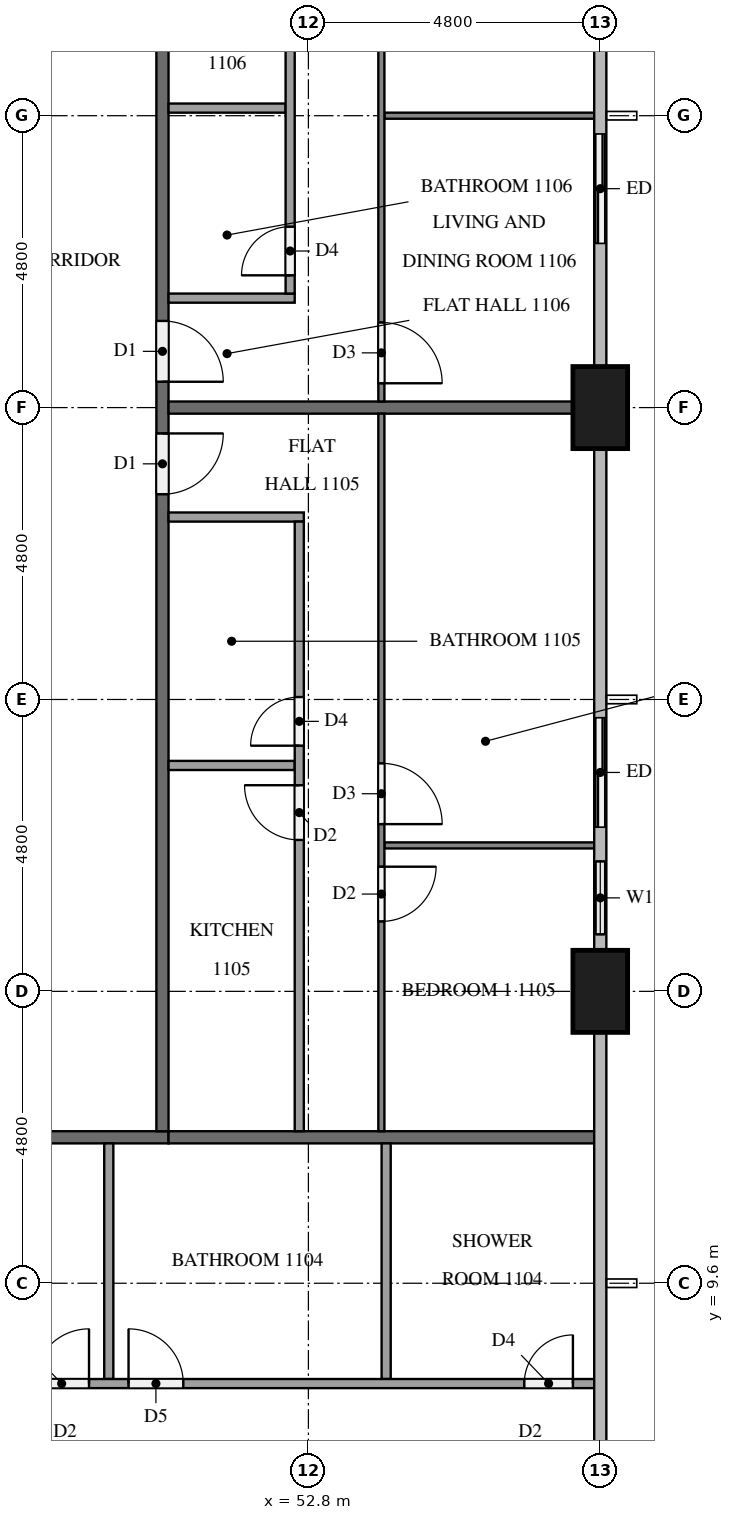
"""IFC4 building model, lengths in metres.
Left out: names, types, materials, properties, quantities, classifications, styles, units other than length and angle.
Written with IfcOpenShell. Run it as: python <this file> out.ifc"""

import sys

from ifc_helpers import new_model, si_unit, direction, frame, frame_2d, origin, origin_2d, place, context, subcontext, project, spatial, rectangle, extrude, element, fill, save


model = new_model("IFC4")
c1 = context("Model", 3, precision=1e-05, world=origin(), true_north=direction((0.0, 1.0)))
c2 = subcontext(c1, "Body", "Model", "MODEL_VIEW")
j1 = project(units=[si_unit("LENGTHUNIT", "METRE"), si_unit("PLANEANGLEUNIT", "RADIAN")], contexts=[c1])
p1 = place(None, origin())
s1 = spatial("IfcSite", under=j1, at=p1, CompositionType="ELEMENT")
p2 = place(p1, origin())
s2 = spatial("IfcBuilding", under=s1, at=p2, CompositionType="ELEMENT")
p3 = place(p2, frame((0.0, 0.0, 46.9)))
s3 = spatial("IfcBuildingStorey", under=s2, at=p3, CompositionType="ELEMENT", Elevation=46.9)
for number, where, z_axis, x_axis in (
    (1, (57.6, 14.4, 0.0), (0.0, 0.0, 1.0), (0.0, 1.0, 0.0)),
    (2, (57.6, 24.0, 0.0), (0.0, 0.0, 1.0), (0.0, 1.0, 0.0)),
):
    element("IfcColumn", number, at=place(p3, frame(where, z_axis=z_axis, x_axis=x_axis)), inside=s3, PredefinedType="COLUMN", context=c2, shape_type="SweptSolid", body=[
        extrude(rectangle(XDim=1.35, YDim=0.9, at=origin_2d()), origin(), (0.0, 0.0, 1.0), 3.2),
    ])
p4 = place(p3, frame((57.6, 15.075, 0.0), z_axis=(0.0, 0.0, 1.0), x_axis=(0.0, 1.0, 0.0)))
e3 = element("IfcWall", 3, at=p4, inside=s3, PredefinedType="SOLIDWALL", context=c2, shape_type="SweptSolid", body=[
    extrude(rectangle(XDim=4.125, YDim=0.15, at=frame_2d((2.062, 0.0))), origin(), (0.0, 0.0, 1.0), 3.2),
])
p5 = place(p4, frame((0.262, 0.0, 0.9)))
e4 = element("IfcOpeningElement", 4, at=p5, cuts=e3, PredefinedType="OPENING", context=c2, shape_type="SweptSolid", body=[
    extrude(rectangle(XDim=1.2, YDim=1.4, at=frame_2d((0.6, 0.7))), frame((0.0, 0.085, 0.0), z_axis=(0.0, -1.0, 0.0), x_axis=(1.0, 0.0, 0.0)), (0.0, 0.0, 1.0), 0.17),
])
p6 = place(p4, frame((2.025, 0.0, 0.0)))
e5 = element("IfcOpeningElement", 5, at=p6, cuts=e3, PredefinedType="OPENING", context=c2, shape_type="SweptSolid", body=[
    extrude(rectangle(XDim=1.8, YDim=2.4, at=frame_2d((0.9, 1.2))), frame((0.0, 0.085, 0.0), z_axis=(0.0, -1.0, 0.0), x_axis=(1.0, 0.0, 0.0)), (0.0, 0.0, 1.0), 0.17),
])
p7 = place(p3, frame((57.6, 26.4, 0.0), z_axis=(0.0, 0.0, 1.0), x_axis=(0.0, 1.0, 0.0)))
e6 = element("IfcWall", 6, at=p7, inside=s3, PredefinedType="SOLIDWALL", context=c2, shape_type="SweptSolid", body=[
    extrude(rectangle(XDim=2.4, YDim=0.15, at=frame_2d((1.2, 0.0))), origin(), (0.0, 0.0, 1.0), 3.2),
])
p8 = place(p7, frame((0.3, 0.0, 0.0)))
e7 = element("IfcOpeningElement", 7, at=p8, cuts=e6, PredefinedType="OPENING", context=c2, shape_type="SweptSolid", body=[
    extrude(rectangle(XDim=1.8, YDim=2.4, at=frame_2d((0.9, 1.2))), frame((0.0, 0.085, 0.0), z_axis=(0.0, -1.0, 0.0), x_axis=(1.0, 0.0, 0.0)), (0.0, 0.0, 1.0), 0.17),
])
p9 = place(p3, frame((50.5, 12.0, 0.0), z_axis=(0.0, 0.0, 1.0), x_axis=(-1.0, 0.0, 0.0)))
e8 = element("IfcWall", 8, at=p9, inside=s3, PredefinedType="PARTITIONING", context=c2, shape_type="SweptSolid", body=[
    extrude(rectangle(XDim=38.6, YDim=0.2, at=frame_2d((19.3, 0.0))), origin(), (0.0, 0.0, 1.0), 3.2),
])
p10 = place(p9, frame((36.525, 0.0, 0.0)))
e9 = element("IfcOpeningElement", 9, at=p10, cuts=e8, PredefinedType="OPENING", context=c2, shape_type="SweptSolid", body=[
    extrude(rectangle(XDim=1.0, YDim=2.1, at=frame_2d((0.5, 1.05))), frame((0.0, 0.11, 0.0), z_axis=(0.0, -1.0, 0.0), x_axis=(1.0, 0.0, 0.0)), (0.0, 0.0, 1.0), 0.22),
])
p11 = place(p9, frame((24.525, 0.0, 0.0)))
e10 = element("IfcOpeningElement", 10, at=p11, cuts=e8, PredefinedType="OPENING", context=c2, shape_type="SweptSolid", body=[
    extrude(rectangle(XDim=1.0, YDim=2.1, at=frame_2d((0.5, 1.05))), frame((0.0, 0.11, 0.0), z_axis=(0.0, -1.0, 0.0), x_axis=(1.0, 0.0, 0.0)), (0.0, 0.0, 1.0), 0.22),
])
p12 = place(p9, frame((22.675, 0.0, 0.0)))
e11 = element("IfcOpeningElement", 11, at=p12, cuts=e8, PredefinedType="OPENING", context=c2, shape_type="SweptSolid", body=[
    extrude(rectangle(XDim=1.0, YDim=2.1, at=frame_2d((0.5, 1.05))), frame((0.0, 0.11, 0.0), z_axis=(0.0, -1.0, 0.0), x_axis=(1.0, 0.0, 0.0)), (0.0, 0.0, 1.0), 0.22),
])
p13 = place(p9, frame((8.275, 0.0, 0.0)))
e12 = element("IfcOpeningElement", 12, at=p13, cuts=e8, PredefinedType="OPENING", context=c2, shape_type="SweptSolid", body=[
    extrude(rectangle(XDim=1.0, YDim=2.1, at=frame_2d((0.5, 1.05))), frame((0.0, 0.11, 0.0), z_axis=(0.0, -1.0, 0.0), x_axis=(1.0, 0.0, 0.0)), (0.0, 0.0, 1.0), 0.22),
])
p14 = place(p3, frame((50.4, 40.7, 0.0), z_axis=(0.0, 0.0, 1.0), x_axis=(0.0, -1.0, 0.0)))
e13 = element("IfcWall", 13, at=p14, inside=s3, PredefinedType="PARTITIONING", context=c2, shape_type="SweptSolid", body=[
    extrude(rectangle(XDim=28.6, YDim=0.2, at=frame_2d((14.3, 0.0))), origin(), (0.0, 0.0, 1.0), 3.2),
])
p15 = place(p14, frame((17.125, 0.0, 0.0)))
e14 = element("IfcOpeningElement", 14, at=p15, cuts=e13, PredefinedType="OPENING", context=c2, shape_type="SweptSolid", body=[
    extrude(rectangle(XDim=1.0, YDim=2.1, at=frame_2d((0.5, 1.05))), frame((0.0, 0.11, 0.0), z_axis=(0.0, -1.0, 0.0), x_axis=(1.0, 0.0, 0.0)), (0.0, 0.0, 1.0), 0.22),
])
p16 = place(p14, frame((15.275, 0.0, 0.0)))
e15 = element("IfcOpeningElement", 15, at=p16, cuts=e13, PredefinedType="OPENING", context=c2, shape_type="SweptSolid", body=[
    extrude(rectangle(XDim=1.0, YDim=2.1, at=frame_2d((0.5, 1.05))), frame((0.0, 0.11, 0.0), z_axis=(0.0, -1.0, 0.0), x_axis=(1.0, 0.0, 0.0)), (0.0, 0.0, 1.0), 0.22),
])
p17 = place(p14, frame((5.675, 0.0, 0.0)))
e16 = element("IfcOpeningElement", 16, at=p17, cuts=e13, PredefinedType="OPENING", context=c2, shape_type="SweptSolid", body=[
    extrude(rectangle(XDim=1.0, YDim=2.1, at=frame_2d((0.5, 1.05))), frame((0.0, 0.11, 0.0), z_axis=(0.0, -1.0, 0.0), x_axis=(1.0, 0.0, 0.0)), (0.0, 0.0, 1.0), 0.22),
])
p18 = place(p3, frame((50.5, 12.0, 0.0), z_axis=(0.0, 0.0, 1.0), x_axis=(1.0, 0.0, 0.0)))
e17 = element("IfcWall", 17, at=p18, inside=s3, PredefinedType="PARTITIONING", context=c2, shape_type="SweptSolid", body=[
    extrude(rectangle(XDim=7.0, YDim=0.2, at=frame_2d((3.5, 0.0))), origin(), (0.0, 0.0, 1.0), 3.2),
])
p19 = place(p3, frame((50.5, 24.0, 0.0), z_axis=(0.0, 0.0, 1.0), x_axis=(1.0, 0.0, 0.0)))
e18 = element("IfcWall", 18, at=p19, inside=s3, PredefinedType="PARTITIONING", context=c2, shape_type="SweptSolid", body=[
    extrude(rectangle(XDim=6.65, YDim=0.2, at=frame_2d((3.325, 0.0))), origin(), (0.0, 0.0, 1.0), 3.2),
])
for number, where, z_axis, x_axis in (
    (19, (49.517, 11.9, 0.0), (0.0, 0.0, 1.0), (0.0, -1.0, 0.0)),
    (20, (54.079, 11.9, 0.0), (0.0, 0.0, 1.0), (0.0, -1.0, 0.0)),
):
    element("IfcWall", number, at=place(p3, frame(where, z_axis=z_axis, x_axis=x_axis)), inside=s3, PredefinedType="PARTITIONING", context=c2, shape_type="SweptSolid", body=[
        extrude(rectangle(XDim=3.875, YDim=0.15, at=frame_2d((1.938, 0.0))), origin(), (0.0, 0.0, 1.0), 3.2),
    ])
p20 = place(p3, frame((42.675, 7.95, 0.0), z_axis=(0.0, 0.0, 1.0), x_axis=(1.0, 0.0, 0.0)))
e21 = element("IfcWall", 21, at=p20, inside=s3, PredefinedType="PARTITIONING", context=c2, shape_type="SweptSolid", body=[
    extrude(rectangle(XDim=14.825, YDim=0.15, at=frame_2d((7.413, 0.0))), origin(), (0.0, 0.0, 1.0), 3.2),
])
p21 = place(p20, frame((5.617, 0.0, 0.0)))
e22 = element("IfcOpeningElement", 22, at=p21, cuts=e21, PredefinedType="OPENING", context=c2, shape_type="SweptSolid", body=[
    extrude(rectangle(XDim=0.9, YDim=2.1, at=frame_2d((0.45, 1.05))), frame((0.0, 0.085, 0.0), z_axis=(0.0, -1.0, 0.0), x_axis=(1.0, 0.0, 0.0)), (0.0, 0.0, 1.0), 0.17),
])
p22 = place(p20, frame((7.167, 0.0, 0.0)))
e23 = element("IfcOpeningElement", 23, at=p22, cuts=e21, PredefinedType="OPENING", context=c2, shape_type="SweptSolid", body=[
    extrude(rectangle(XDim=0.9, YDim=2.1, at=frame_2d((0.45, 1.05))), frame((0.0, 0.085, 0.0), z_axis=(0.0, -1.0, 0.0), x_axis=(1.0, 0.0, 0.0)), (0.0, 0.0, 1.0), 0.17),
])
p23 = place(p20, frame((13.675, 0.0, 0.0)))
e24 = element("IfcOpeningElement", 24, at=p23, cuts=e21, PredefinedType="OPENING", context=c2, shape_type="SweptSolid", body=[
    extrude(rectangle(XDim=0.8, YDim=2.1, at=frame_2d((0.4, 1.05))), frame((0.0, 0.085, 0.0), z_axis=(0.0, -1.0, 0.0), x_axis=(1.0, 0.0, 0.0)), (0.0, 0.0, 1.0), 0.17),
])
p24 = place(p3, frame((54.05, 16.8, 0.0), z_axis=(0.0, 0.0, 1.0), x_axis=(1.0, 0.0, 0.0)))
e25 = element("IfcWall", 25, at=p24, inside=s3, PredefinedType="PARTITIONING", context=c2, shape_type="SweptSolid", body=[
    extrude(rectangle(XDim=3.45, YDim=0.1, at=frame_2d((1.725, 0.0))), origin(), (0.0, 0.0, 1.0), 3.2),
])
p25 = place(p3, frame((54.0, 23.9, 0.0), z_axis=(0.0, 0.0, 1.0), x_axis=(0.0, -1.0, 0.0)))
e26 = element("IfcWall", 26, at=p25, inside=s3, PredefinedType="PARTITIONING", context=c2, shape_type="SweptSolid", body=[
    extrude(rectangle(XDim=11.8, YDim=0.1, at=frame_2d((5.9, 0.0))), origin(), (0.0, 0.0, 1.0), 3.2),
])
p26 = place(p25, frame((5.75, 0.0, 0.0)))
e27 = element("IfcOpeningElement", 27, at=p26, cuts=e26, PredefinedType="OPENING", context=c2, shape_type="SweptSolid", body=[
    extrude(rectangle(XDim=1.0, YDim=2.1, at=frame_2d((0.5, 1.05))), frame((0.0, 0.06, 0.0), z_axis=(0.0, -1.0, 0.0), x_axis=(1.0, 0.0, 0.0)), (0.0, 0.0, 1.0), 0.12),
])
p27 = place(p25, frame((7.45, 0.0, 0.0)))
e28 = element("IfcOpeningElement", 28, at=p27, cuts=e26, PredefinedType="OPENING", context=c2, shape_type="SweptSolid", body=[
    extrude(rectangle(XDim=0.9, YDim=2.1, at=frame_2d((0.45, 1.05))), frame((0.0, 0.06, 0.0), z_axis=(0.0, -1.0, 0.0), x_axis=(1.0, 0.0, 0.0)), (0.0, 0.0, 1.0), 0.12),
])
p28 = place(p3, frame((50.5, 18.115, 0.0), z_axis=(0.0, 0.0, 1.0), x_axis=(1.0, 0.0, 0.0)))
e29 = element("IfcWall", 29, at=p28, inside=s3, PredefinedType="PARTITIONING", context=c2, shape_type="SweptSolid", body=[
    extrude(rectangle(XDim=2.075, YDim=0.15, at=frame_2d((1.038, 0.0))), origin(), (0.0, 0.0, 1.0), 3.2),
])
p29 = place(p3, frame((50.5, 22.2, 0.0), z_axis=(0.0, 0.0, 1.0), x_axis=(1.0, 0.0, 0.0)))
e30 = element("IfcWall", 30, at=p29, inside=s3, PredefinedType="PARTITIONING", context=c2, shape_type="SweptSolid", body=[
    extrude(rectangle(XDim=2.225, YDim=0.15, at=frame_2d((1.113, 0.0))), origin(), (0.0, 0.0, 1.0), 3.2),
])
p30 = place(p3, frame((52.65, 12.1, 0.0), z_axis=(0.0, 0.0, 1.0), x_axis=(0.0, 1.0, 0.0)))
e31 = element("IfcWall", 31, at=p30, inside=s3, PredefinedType="PARTITIONING", context=c2, shape_type="SweptSolid", body=[
    extrude(rectangle(XDim=10.025, YDim=0.15, at=frame_2d((5.012, 0.0))), origin(), (0.0, 0.0, 1.0), 3.2),
])
p31 = place(p30, frame((6.34, 0.0, 0.0)))
e32 = element("IfcOpeningElement", 32, at=p31, cuts=e31, PredefinedType="OPENING", context=c2, shape_type="SweptSolid", body=[
    extrude(rectangle(XDim=0.8, YDim=2.1, at=frame_2d((0.4, 1.05))), frame((0.0, 0.085, 0.0), z_axis=(0.0, -1.0, 0.0), x_axis=(1.0, 0.0, 0.0)), (0.0, 0.0, 1.0), 0.17),
])
p32 = place(p30, frame((4.79, 0.0, 0.0)))
e33 = element("IfcOpeningElement", 33, at=p32, cuts=e31, PredefinedType="OPENING", context=c2, shape_type="SweptSolid", body=[
    extrude(rectangle(XDim=0.9, YDim=2.1, at=frame_2d((0.45, 1.05))), frame((0.0, 0.085, 0.0), z_axis=(0.0, -1.0, 0.0), x_axis=(1.0, 0.0, 0.0)), (0.0, 0.0, 1.0), 0.17),
])
p33 = place(p3, frame((54.05, 28.8, 0.0), z_axis=(0.0, 0.0, 1.0), x_axis=(1.0, 0.0, 0.0)))
e34 = element("IfcWall", 34, at=p33, inside=s3, PredefinedType="PARTITIONING", context=c2, shape_type="SweptSolid", body=[
    extrude(rectangle(XDim=3.45, YDim=0.1, at=frame_2d((1.725, 0.0))), origin(), (0.0, 0.0, 1.0), 3.2),
])
p34 = place(p3, frame((54.0, 33.5, 0.0), z_axis=(0.0, 0.0, 1.0), x_axis=(0.0, -1.0, 0.0)))
e35 = element("IfcWall", 35, at=p34, inside=s3, PredefinedType="PARTITIONING", context=c2, shape_type="SweptSolid", body=[
    extrude(rectangle(XDim=9.4, YDim=0.1, at=frame_2d((4.7, 0.0))), origin(), (0.0, 0.0, 1.0), 3.2),
])
p35 = place(p34, frame((8.1, 0.0, 0.0)))
e36 = element("IfcOpeningElement", 36, at=p35, cuts=e35, PredefinedType="OPENING", context=c2, shape_type="SweptSolid", body=[
    extrude(rectangle(XDim=1.0, YDim=2.1, at=frame_2d((0.5, 1.05))), frame((0.0, 0.06, 0.0), z_axis=(0.0, -1.0, 0.0), x_axis=(1.0, 0.0, 0.0)), (0.0, 0.0, 1.0), 0.12),
])
p36 = place(p34, frame((0.3, 0.0, 0.0)))
e37 = element("IfcOpeningElement", 37, at=p36, cuts=e35, PredefinedType="OPENING", context=c2, shape_type="SweptSolid", body=[
    extrude(rectangle(XDim=0.9, YDim=2.1, at=frame_2d((0.45, 1.05))), frame((0.0, 0.06, 0.0), z_axis=(0.0, -1.0, 0.0), x_axis=(1.0, 0.0, 0.0)), (0.0, 0.0, 1.0), 0.12),
])
p37 = place(p3, frame((50.5, 28.925, 0.0), z_axis=(0.0, 0.0, 1.0), x_axis=(1.0, 0.0, 0.0)))
e38 = element("IfcWall", 38, at=p37, inside=s3, PredefinedType="PARTITIONING", context=c2, shape_type="SweptSolid", body=[
    extrude(rectangle(XDim=1.925, YDim=0.15, at=frame_2d((0.962, 0.0))), origin(), (0.0, 0.0, 1.0), 3.2),
])
p38 = place(p3, frame((50.5, 25.8, 0.0), z_axis=(0.0, 0.0, 1.0), x_axis=(1.0, 0.0, 0.0)))
e39 = element("IfcWall", 39, at=p38, inside=s3, PredefinedType="PARTITIONING", context=c2, shape_type="SweptSolid", body=[
    extrude(rectangle(XDim=2.075, YDim=0.15, at=frame_2d((1.038, 0.0))), origin(), (0.0, 0.0, 1.0), 3.2),
])
p39 = place(p3, frame((52.5, 25.875, 0.0), z_axis=(0.0, 0.0, 1.0), x_axis=(0.0, 1.0, 0.0)))
e40 = element("IfcWall", 40, at=p39, inside=s3, PredefinedType="PARTITIONING", context=c2, shape_type="SweptSolid", body=[
    extrude(rectangle(XDim=7.625, YDim=0.15, at=frame_2d((3.812, 0.0))), origin(), (0.0, 0.0, 1.0), 3.2),
])
p40 = place(p39, frame((0.3, 0.0, 0.0)))
e41 = element("IfcOpeningElement", 41, at=p40, cuts=e40, PredefinedType="OPENING", context=c2, shape_type="SweptSolid", body=[
    extrude(rectangle(XDim=0.8, YDim=2.1, at=frame_2d((0.4, 1.05))), frame((0.0, 0.085, 0.0), z_axis=(0.0, -1.0, 0.0), x_axis=(1.0, 0.0, 0.0)), (0.0, 0.0, 1.0), 0.17),
])
p41 = place(p39, frame((6.375, 0.0, 0.0)))
e42 = element("IfcOpeningElement", 42, at=p41, cuts=e40, PredefinedType="OPENING", context=c2, shape_type="SweptSolid", body=[
    extrude(rectangle(XDim=0.9, YDim=2.1, at=frame_2d((0.45, 1.05))), frame((0.0, 0.085, 0.0), z_axis=(0.0, -1.0, 0.0), x_axis=(1.0, 0.0, 0.0)), (0.0, 0.0, 1.0), 0.17),
])
p42 = place(p5, origin())
e43 = element("IfcWindow", 43, at=p42, inside=s3, PartitioningType="SINGLE_PANEL", PredefinedType="WINDOW", context=c2, shape_type="SweptSolid", body=[
    extrude(rectangle(XDim=1.2, YDim=1.4, at=frame_2d((0.6, 0.7))), frame((0.0, 0.03, 0.0), z_axis=(0.0, -1.0, 0.0), x_axis=(1.0, 0.0, 0.0)), (0.0, 0.0, 1.0), 0.06),
])
fill(e4, e43)
p43 = place(p6, origin())
e44 = element("IfcDoor", 44, at=p43, inside=s3, OperationType="SLIDING_TO_RIGHT", PredefinedType="DOOR", context=c2, shape_type="SweptSolid", body=[
    extrude(rectangle(XDim=1.8, YDim=2.4, at=frame_2d((0.9, 1.2))), frame((0.0, 0.025, 0.0), z_axis=(0.0, -1.0, 0.0), x_axis=(1.0, 0.0, 0.0)), (0.0, 0.0, 1.0), 0.05),
])
fill(e5, e44)
p44 = place(p8, origin())
e45 = element("IfcDoor", 45, at=p44, inside=s3, OperationType="SLIDING_TO_LEFT", PredefinedType="DOOR", context=c2, shape_type="SweptSolid", body=[
    extrude(rectangle(XDim=1.8, YDim=2.4, at=frame_2d((0.9, 1.2))), frame((0.0, 0.025, 0.0), z_axis=(0.0, -1.0, 0.0), x_axis=(1.0, 0.0, 0.0)), (0.0, 0.0, 1.0), 0.05),
])
fill(e7, e45)
p45 = place(p15, origin())
e46 = element("IfcDoor", 46, at=p45, inside=s3, OperationType="SINGLE_SWING_LEFT", PredefinedType="DOOR", context=c2, shape_type="SweptSolid", body=[
    extrude(rectangle(XDim=1.0, YDim=2.1, at=frame_2d((0.5, 1.05))), frame((0.0, 0.025, 0.0), z_axis=(0.0, -1.0, 0.0), x_axis=(1.0, 0.0, 0.0)), (0.0, 0.0, 1.0), 0.05),
])
fill(e14, e46)
p46 = place(p16, origin())
e47 = element("IfcDoor", 47, at=p46, inside=s3, OperationType="SINGLE_SWING_RIGHT", PredefinedType="DOOR", context=c2, shape_type="SweptSolid", body=[
    extrude(rectangle(XDim=1.0, YDim=2.1, at=frame_2d((0.5, 1.05))), frame((0.0, 0.025, 0.0), z_axis=(0.0, -1.0, 0.0), x_axis=(1.0, 0.0, 0.0)), (0.0, 0.0, 1.0), 0.05),
])
fill(e15, e47)
p47 = place(p21, origin())
e48 = element("IfcDoor", 48, at=p47, inside=s3, OperationType="SINGLE_SWING_RIGHT", PredefinedType="DOOR", context=c2, shape_type="SweptSolid", body=[
    extrude(rectangle(XDim=0.9, YDim=2.1, at=frame_2d((0.45, 1.05))), frame((0.0, 0.025, 0.0), z_axis=(0.0, -1.0, 0.0), x_axis=(1.0, 0.0, 0.0)), (0.0, 0.0, 1.0), 0.05),
])
fill(e22, e48)
p48 = place(p22, origin())
e49 = element("IfcDoor", 49, at=p48, inside=s3, OperationType="SINGLE_SWING_LEFT", PredefinedType="DOOR", context=c2, shape_type="SweptSolid", body=[
    extrude(rectangle(XDim=0.9, YDim=2.1, at=frame_2d((0.45, 1.05))), frame((0.0, 0.025, 0.0), z_axis=(0.0, -1.0, 0.0), x_axis=(1.0, 0.0, 0.0)), (0.0, 0.0, 1.0), 0.05),
])
fill(e23, e49)
p49 = place(p23, origin())
e50 = element("IfcDoor", 50, at=p49, inside=s3, OperationType="SINGLE_SWING_RIGHT", PredefinedType="DOOR", context=c2, shape_type="SweptSolid", body=[
    extrude(rectangle(XDim=0.8, YDim=2.1, at=frame_2d((0.4, 1.05))), frame((0.0, 0.025, 0.0), z_axis=(0.0, -1.0, 0.0), x_axis=(1.0, 0.0, 0.0)), (0.0, 0.0, 1.0), 0.05),
])
fill(e24, e50)
p50 = place(p26, origin())
e51 = element("IfcDoor", 51, at=p50, inside=s3, OperationType="SINGLE_SWING_RIGHT", PredefinedType="DOOR", context=c2, shape_type="SweptSolid", body=[
    extrude(rectangle(XDim=1.0, YDim=2.1, at=frame_2d((0.5, 1.05))), frame((0.0, 0.025, 0.0), z_axis=(0.0, -1.0, 0.0), x_axis=(1.0, 0.0, 0.0)), (0.0, 0.0, 1.0), 0.05),
])
fill(e27, e51)
p51 = place(p27, origin())
e52 = element("IfcDoor", 52, at=p51, inside=s3, OperationType="SINGLE_SWING_LEFT", PredefinedType="DOOR", context=c2, shape_type="SweptSolid", body=[
    extrude(rectangle(XDim=0.9, YDim=2.1, at=frame_2d((0.45, 1.05))), frame((0.0, 0.025, 0.0), z_axis=(0.0, -1.0, 0.0), x_axis=(1.0, 0.0, 0.0)), (0.0, 0.0, 1.0), 0.05),
])
fill(e28, e52)
p52 = place(p31, origin())
e53 = element("IfcDoor", 53, at=p52, inside=s3, OperationType="SINGLE_SWING_LEFT", PredefinedType="DOOR", context=c2, shape_type="SweptSolid", body=[
    extrude(rectangle(XDim=0.8, YDim=2.1, at=frame_2d((0.4, 1.05))), frame((0.0, 0.025, 0.0), z_axis=(0.0, -1.0, 0.0), x_axis=(1.0, 0.0, 0.0)), (0.0, 0.0, 1.0), 0.05),
])
fill(e32, e53)
p53 = place(p32, origin())
e54 = element("IfcDoor", 54, at=p53, inside=s3, OperationType="SINGLE_SWING_RIGHT", PredefinedType="DOOR", context=c2, shape_type="SweptSolid", body=[
    extrude(rectangle(XDim=0.9, YDim=2.1, at=frame_2d((0.45, 1.05))), frame((0.0, 0.025, 0.0), z_axis=(0.0, -1.0, 0.0), x_axis=(1.0, 0.0, 0.0)), (0.0, 0.0, 1.0), 0.05),
])
fill(e33, e54)
p54 = place(p35, origin())
e55 = element("IfcDoor", 55, at=p54, inside=s3, OperationType="SINGLE_SWING_RIGHT", PredefinedType="DOOR", context=c2, shape_type="SweptSolid", body=[
    extrude(rectangle(XDim=1.0, YDim=2.1, at=frame_2d((0.5, 1.05))), frame((0.0, 0.025, 0.0), z_axis=(0.0, -1.0, 0.0), x_axis=(1.0, 0.0, 0.0)), (0.0, 0.0, 1.0), 0.05),
])
fill(e36, e55)
p55 = place(p40, origin())
e56 = element("IfcDoor", 56, at=p55, inside=s3, OperationType="SINGLE_SWING_LEFT", PredefinedType="DOOR", context=c2, shape_type="SweptSolid", body=[
    extrude(rectangle(XDim=0.8, YDim=2.1, at=frame_2d((0.4, 1.05))), frame((0.0, 0.025, 0.0), z_axis=(0.0, -1.0, 0.0), x_axis=(1.0, 0.0, 0.0)), (0.0, 0.0, 1.0), 0.05),
])
fill(e41, e56)
save(model, sys.argv[1])
